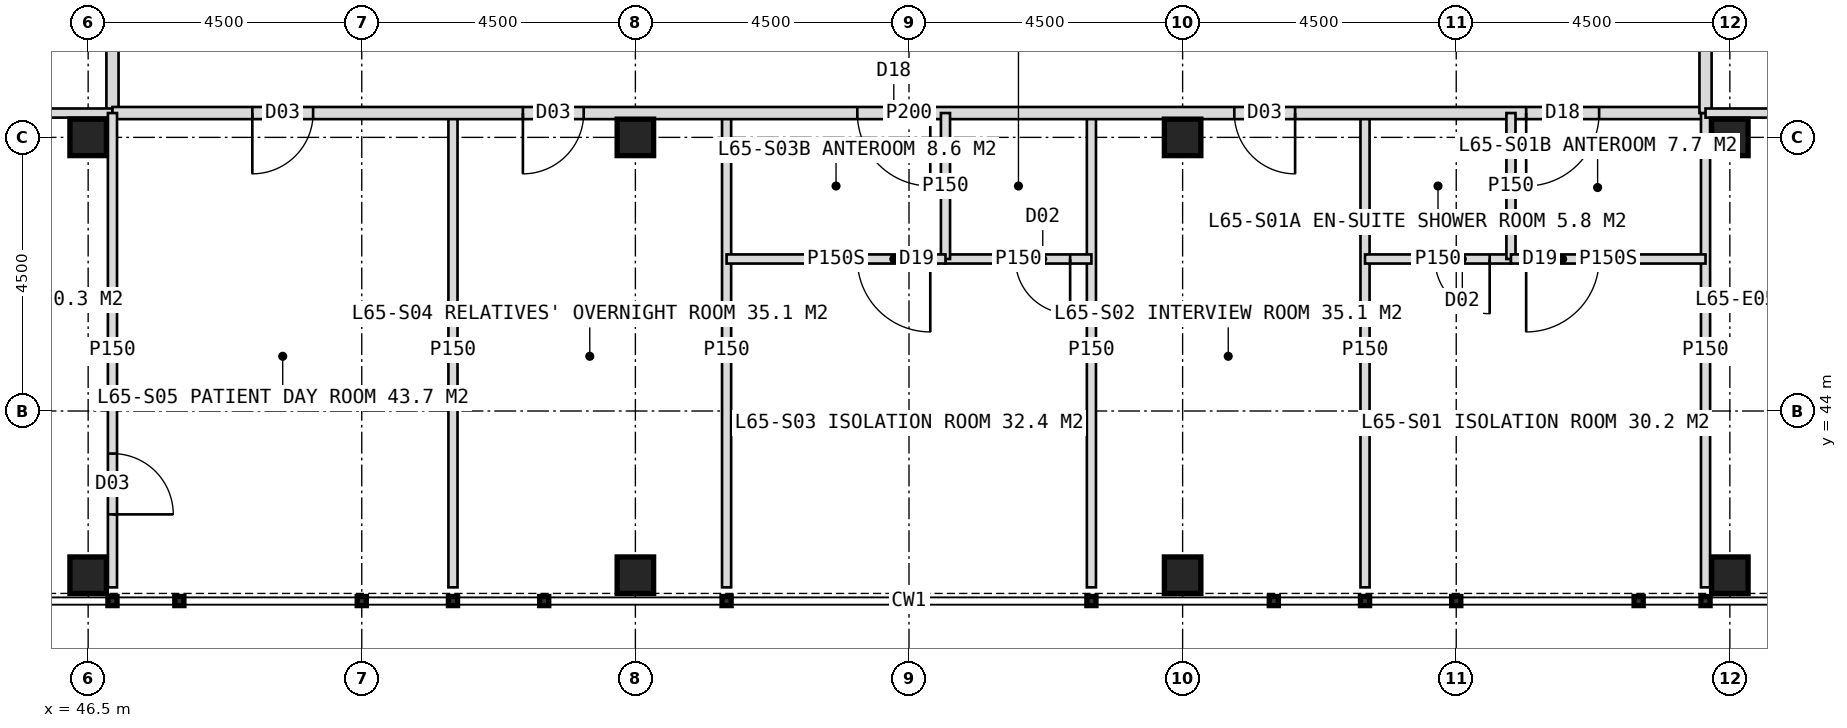
"""IFC4 building model, lengths in metres.
Left out: names, types, materials, properties, quantities, classifications, styles, units other than length and angle.
Written with IfcOpenShell. Run it as: python <this file> out.ifc"""

import sys

from ifc_helpers import new_model, si_unit, direction, frame, frame_2d, origin, origin_2d, place, context, subcontext, project, spatial, rectangle, hollow_rectangle, extrude, element, fill, save


model = new_model("IFC4")
c1 = context("Model", 3, precision=1e-05, world=origin(), true_north=direction((0.0, 1.0)))
c2 = subcontext(c1, "Body", "Model", "MODEL_VIEW")
j1 = project(units=[si_unit("LENGTHUNIT", "METRE"), si_unit("PLANEANGLEUNIT", "RADIAN")], contexts=[c1])
p1 = place(None, origin())
s1 = spatial("IfcSite", under=j1, at=p1, CompositionType="ELEMENT")
p2 = place(p1, origin())
s2 = spatial("IfcBuilding", under=s1, at=p2, CompositionType="ELEMENT")
p3 = place(p2, frame((0.0, 0.0, 270.0)))
s3 = spatial("IfcBuildingStorey", under=s2, at=p3, CompositionType="ELEMENT", Elevation=270.0)
for number, where, z_axis, x_axis in (
    (1, (46.5, 48.5, 0.0), (0.0, 0.0, 1.0), (1.0, 0.0, 0.0)),
    (2, (73.5, 48.5, 0.0), (0.0, 0.0, 1.0), (1.0, 0.0, 0.0)),
    (3, (55.5, 48.5, 0.0), (0.0, 0.0, 1.0), (1.0, 0.0, 0.0)),
    (4, (64.5, 48.5, 0.0), (0.0, 0.0, 1.0), (1.0, 0.0, 0.0)),
    (5, (46.5, 41.3, 0.0), (0.0, 0.0, 1.0), (1.0, 0.0, 0.0)),
    (6, (55.5, 41.3, 0.0), (0.0, 0.0, 1.0), (1.0, 0.0, 0.0)),
    (7, (64.5, 41.3, 0.0), (0.0, 0.0, 1.0), (1.0, 0.0, 0.0)),
    (8, (73.5, 41.3, 0.0), (0.0, 0.0, 1.0), (1.0, 0.0, 0.0)),
):
    element("IfcColumn", number, at=place(p3, frame(where, z_axis=z_axis, x_axis=x_axis)), inside=s3, PredefinedType="COLUMN", context=c2, shape_type="SweptSolid", body=[
        extrude(hollow_rectangle(XDim=0.6, YDim=0.6, WallThickness=0.04, at=origin_2d()), origin(), (0.0, 0.0, 1.0), 4.0),
    ])
p4 = place(p3, frame((46.9, 48.9, 0.0), z_axis=(0.0, 0.0, 1.0), x_axis=(0.0, 1.0, 0.0)))
e9 = element("IfcWall", 9, at=p4, inside=s3, PredefinedType="PARTITIONING", context=c2, shape_type="SweptSolid", body=[
    extrude(rectangle(XDim=26.2, YDim=0.2, at=frame_2d((13.1, 0.0))), origin(), (0.0, 0.0, 1.0), 3.75),
])
p5 = place(p4, frame((1.55, 0.0, 0.0)))
e10 = element("IfcOpeningElement", 10, at=p5, cuts=e9, PredefinedType="OPENING", context=c2, shape_type="SweptSolid", body=[
    extrude(rectangle(XDim=1.0, YDim=2.1, at=frame_2d((0.5, 1.05))), frame((0.0, 0.11, 0.0), z_axis=(0.0, -1.0, 0.0), x_axis=(1.0, 0.0, 0.0)), (0.0, 0.0, 1.0), 0.22),
])
p6 = place(p4, frame((6.6, 0.0, 0.0)))
e11 = element("IfcOpeningElement", 11, at=p6, cuts=e9, PredefinedType="OPENING", context=c2, shape_type="SweptSolid", body=[
    extrude(rectangle(XDim=1.0, YDim=2.1, at=frame_2d((0.5, 1.05))), frame((0.0, 0.11, 0.0), z_axis=(0.0, -1.0, 0.0), x_axis=(1.0, 0.0, 0.0)), (0.0, 0.0, 1.0), 0.22),
])
p7 = place(p4, frame((11.1, 0.0, 0.0)))
e12 = element("IfcOpeningElement", 12, at=p7, cuts=e9, PredefinedType="OPENING", context=c2, shape_type="SweptSolid", body=[
    extrude(rectangle(XDim=1.0, YDim=2.1, at=frame_2d((0.5, 1.05))), frame((0.0, 0.11, 0.0), z_axis=(0.0, -1.0, 0.0), x_axis=(1.0, 0.0, 0.0)), (0.0, 0.0, 1.0), 0.22),
])
p8 = place(p4, frame((18.45, 0.0, 0.0)))
e13 = element("IfcOpeningElement", 13, at=p8, cuts=e9, PredefinedType="OPENING", context=c2, shape_type="SweptSolid", body=[
    extrude(rectangle(XDim=1.2, YDim=2.2, at=frame_2d((0.6, 1.1))), frame((0.0, 0.11, 0.0), z_axis=(0.0, -1.0, 0.0), x_axis=(1.0, 0.0, 0.0)), (0.0, 0.0, 1.0), 0.22),
])
p9 = place(p4, frame((22.9, 0.0, 0.0)))
e14 = element("IfcOpeningElement", 14, at=p9, cuts=e9, PredefinedType="OPENING", context=c2, shape_type="SweptSolid", body=[
    extrude(rectangle(XDim=1.0, YDim=2.1, at=frame_2d((0.5, 1.05))), frame((0.0, 0.11, 0.0), z_axis=(0.0, -1.0, 0.0), x_axis=(1.0, 0.0, 0.0)), (0.0, 0.0, 1.0), 0.22),
])
for number, where, z_axis, x_axis in (
    (15, (46.9, 48.9, 0.0), (0.0, 0.0, 1.0), (-1.0, 0.0, 0.0)),
    (16, (67.5, 48.9, 0.0), (0.0, 0.0, 1.0), (0.0, -1.0, 0.0)),
    (17, (63.0, 48.9, 0.0), (0.0, 0.0, 1.0), (0.0, -1.0, 0.0)),
    (18, (57.0, 48.9, 0.0), (0.0, 0.0, 1.0), (0.0, -1.0, 0.0)),
    (19, (52.5, 48.9, 0.0), (0.0, 0.0, 1.0), (0.0, -1.0, 0.0)),
):
    element("IfcWall", number, at=place(p3, frame(where, z_axis=z_axis, x_axis=x_axis)), inside=s3, PredefinedType="PARTITIONING", context=c2, shape_type="SweptSolid", body=[
        extrude(rectangle(XDim=7.8, YDim=0.15, at=frame_2d((3.9, 0.0))), origin(), (0.0, 0.0, 1.0), 3.75),
    ])
p10 = place(p3, frame((73.1, 48.9, 0.0), z_axis=(0.0, 0.0, 1.0), x_axis=(-1.0, 0.0, 0.0)))
e20 = element("IfcWall", 20, at=p10, inside=s3, PredefinedType="PARTITIONING", context=c2, shape_type="SweptSolid", body=[
    extrude(rectangle(XDim=26.2, YDim=0.2, at=frame_2d((13.1, 0.0))), origin(), (0.0, 0.0, 1.0), 3.75),
])
p11 = place(p10, frame((1.75, 0.0, 0.0)))
e21 = element("IfcOpeningElement", 21, at=p11, cuts=e20, PredefinedType="OPENING", context=c2, shape_type="SweptSolid", body=[
    extrude(rectangle(XDim=1.2, YDim=2.2, at=frame_2d((0.6, 1.1))), frame((0.0, 0.11, 0.0), z_axis=(0.0, -1.0, 0.0), x_axis=(1.0, 0.0, 0.0)), (0.0, 0.0, 1.0), 0.22),
])
p12 = place(p10, frame((6.75, 0.0, 0.0)))
e22 = element("IfcOpeningElement", 22, at=p12, cuts=e20, PredefinedType="OPENING", context=c2, shape_type="SweptSolid", body=[
    extrude(rectangle(XDim=1.0, YDim=2.1, at=frame_2d((0.5, 1.05))), frame((0.0, 0.11, 0.0), z_axis=(0.0, -1.0, 0.0), x_axis=(1.0, 0.0, 0.0)), (0.0, 0.0, 1.0), 0.22),
])
p13 = place(p10, frame((12.75, 0.0, 0.0)))
e23 = element("IfcOpeningElement", 23, at=p13, cuts=e20, PredefinedType="OPENING", context=c2, shape_type="SweptSolid", body=[
    extrude(rectangle(XDim=1.2, YDim=2.2, at=frame_2d((0.6, 1.1))), frame((0.0, 0.11, 0.0), z_axis=(0.0, -1.0, 0.0), x_axis=(1.0, 0.0, 0.0)), (0.0, 0.0, 1.0), 0.22),
])
p14 = place(p10, frame((18.45, 0.0, 0.0)))
e24 = element("IfcOpeningElement", 24, at=p14, cuts=e20, PredefinedType="OPENING", context=c2, shape_type="SweptSolid", body=[
    extrude(rectangle(XDim=1.0, YDim=2.1, at=frame_2d((0.5, 1.05))), frame((0.0, 0.11, 0.0), z_axis=(0.0, -1.0, 0.0), x_axis=(1.0, 0.0, 0.0)), (0.0, 0.0, 1.0), 0.22),
])
p15 = place(p10, frame((22.9, 0.0, 0.0)))
e25 = element("IfcOpeningElement", 25, at=p15, cuts=e20, PredefinedType="OPENING", context=c2, shape_type="SweptSolid", body=[
    extrude(rectangle(XDim=1.0, YDim=2.1, at=frame_2d((0.5, 1.05))), frame((0.0, 0.11, 0.0), z_axis=(0.0, -1.0, 0.0), x_axis=(1.0, 0.0, 0.0)), (0.0, 0.0, 1.0), 0.22),
])
p16 = place(p3, frame((73.1, 48.9, 0.0), z_axis=(0.0, 0.0, 1.0), x_axis=(0.0, -1.0, 0.0)))
e26 = element("IfcWall", 26, at=p16, inside=s3, PredefinedType="PARTITIONING", context=c2, shape_type="SweptSolid", body=[
    extrude(rectangle(XDim=7.8, YDim=0.15, at=frame_2d((3.9, 0.0))), origin(), (0.0, 0.0, 1.0), 3.75),
])
p17 = place(p3, frame((69.9, 46.5, 0.0), z_axis=(0.0, 0.0, 1.0), x_axis=(-1.0, 0.0, 0.0)))
e27 = element("IfcWall", 27, at=p17, inside=s3, PredefinedType="PARTITIONING", context=c2, shape_type="SweptSolid", body=[
    extrude(rectangle(XDim=2.4, YDim=0.15, at=frame_2d((1.2, 0.0))), origin(), (0.0, 0.0, 1.0), 3.75),
])
p18 = place(p17, frame((0.35, 0.0, 0.0)))
e28 = element("IfcOpeningElement", 28, at=p18, cuts=e27, PredefinedType="OPENING", context=c2, shape_type="SweptSolid", body=[
    extrude(rectangle(XDim=0.9, YDim=2.1, at=frame_2d((0.45, 1.05))), frame((0.0, 0.085, 0.0), z_axis=(0.0, -1.0, 0.0), x_axis=(1.0, 0.0, 0.0)), (0.0, 0.0, 1.0), 0.17),
])
p19 = place(p3, frame((69.9, 48.9, 0.0), z_axis=(0.0, 0.0, 1.0), x_axis=(0.0, -1.0, 0.0)))
e29 = element("IfcWall", 29, at=p19, inside=s3, PredefinedType="PARTITIONING", context=c2, shape_type="SweptSolid", body=[
    extrude(rectangle(XDim=2.4, YDim=0.15, at=frame_2d((1.2, 0.0))), origin(), (0.0, 0.0, 1.0), 3.75),
])
p20 = place(p3, frame((73.1, 46.5, 0.0), z_axis=(0.0, 0.0, 1.0), x_axis=(-1.0, 0.0, 0.0)))
e30 = element("IfcWall", 30, at=p20, inside=s3, PredefinedType="PARTITIONING", context=c2, shape_type="SweptSolid", body=[
    extrude(rectangle(XDim=3.2, YDim=0.15, at=frame_2d((1.6, 0.0))), origin(), (0.0, 0.0, 1.0), 3.75),
])
p21 = place(p20, frame((1.75, 0.0, 0.0)))
e31 = element("IfcOpeningElement", 31, at=p21, cuts=e30, PredefinedType="OPENING", context=c2, shape_type="SweptSolid", body=[
    extrude(rectangle(XDim=1.2, YDim=2.2, at=frame_2d((0.6, 1.1))), frame((0.0, 0.085, 0.0), z_axis=(0.0, -1.0, 0.0), x_axis=(1.0, 0.0, 0.0)), (0.0, 0.0, 1.0), 0.17),
])
p22 = place(p3, frame((63.0, 46.5, 0.0), z_axis=(0.0, 0.0, 1.0), x_axis=(-1.0, 0.0, 0.0)))
e32 = element("IfcWall", 32, at=p22, inside=s3, PredefinedType="PARTITIONING", context=c2, shape_type="SweptSolid", body=[
    extrude(rectangle(XDim=2.4, YDim=0.15, at=frame_2d((1.2, 0.0))), origin(), (0.0, 0.0, 1.0), 3.75),
])
p23 = place(p22, frame((0.35, 0.0, 0.0)))
e33 = element("IfcOpeningElement", 33, at=p23, cuts=e32, PredefinedType="OPENING", context=c2, shape_type="SweptSolid", body=[
    extrude(rectangle(XDim=0.9, YDim=2.1, at=frame_2d((0.45, 1.05))), frame((0.0, 0.085, 0.0), z_axis=(0.0, -1.0, 0.0), x_axis=(1.0, 0.0, 0.0)), (0.0, 0.0, 1.0), 0.17),
])
p24 = place(p3, frame((60.6, 48.9, 0.0), z_axis=(0.0, 0.0, 1.0), x_axis=(0.0, -1.0, 0.0)))
e34 = element("IfcWall", 34, at=p24, inside=s3, PredefinedType="PARTITIONING", context=c2, shape_type="SweptSolid", body=[
    extrude(rectangle(XDim=2.4, YDim=0.15, at=frame_2d((1.2, 0.0))), origin(), (0.0, 0.0, 1.0), 3.75),
])
p25 = place(p3, frame((60.6, 46.5, 0.0), z_axis=(0.0, 0.0, 1.0), x_axis=(-1.0, 0.0, 0.0)))
e35 = element("IfcWall", 35, at=p25, inside=s3, PredefinedType="PARTITIONING", context=c2, shape_type="SweptSolid", body=[
    extrude(rectangle(XDim=3.6, YDim=0.15, at=frame_2d((1.8, 0.0))), origin(), (0.0, 0.0, 1.0), 3.75),
])
p26 = place(p25, frame((0.25, 0.0, 0.0)))
e36 = element("IfcOpeningElement", 36, at=p26, cuts=e35, PredefinedType="OPENING", context=c2, shape_type="SweptSolid", body=[
    extrude(rectangle(XDim=1.2, YDim=2.2, at=frame_2d((0.6, 1.1))), frame((0.0, 0.085, 0.0), z_axis=(0.0, -1.0, 0.0), x_axis=(1.0, 0.0, 0.0)), (0.0, 0.0, 1.0), 0.17),
])
p27 = place(p3, frame((46.9, 48.9, 0.0), z_axis=(0.0, 0.0, 1.0), x_axis=(0.0, -1.0, 0.0)))
e37 = element("IfcWall", 37, at=p27, inside=s3, PredefinedType="PARTITIONING", context=c2, shape_type="SweptSolid", body=[
    extrude(rectangle(XDim=7.8, YDim=0.15, at=frame_2d((3.9, 0.0))), origin(), (0.0, 0.0, 1.0), 3.75),
])
p28 = place(p27, frame((5.6, 0.0, 0.0)))
e38 = element("IfcOpeningElement", 38, at=p28, cuts=e37, PredefinedType="OPENING", context=c2, shape_type="SweptSolid", body=[
    extrude(rectangle(XDim=1.0, YDim=2.1, at=frame_2d((0.5, 1.05))), frame((0.0, 0.085, 0.0), z_axis=(0.0, -1.0, 0.0), x_axis=(1.0, 0.0, 0.0)), (0.0, 0.0, 1.0), 0.17),
])
p29 = place(p3, frame((73.1, 71.0, 0.0), z_axis=(0.0, 0.0, 1.0), x_axis=(0.0, -1.0, 0.0)))
e39 = element("IfcWall", 39, at=p29, inside=s3, PredefinedType="PARTITIONING", context=c2, shape_type="SweptSolid", body=[
    extrude(rectangle(XDim=22.1, YDim=0.2, at=frame_2d((11.05, 0.0))), origin(), (0.0, 0.0, 1.0), 3.75),
])
p30 = place(p29, frame((2.65, 0.0, 0.0)))
e40 = element("IfcOpeningElement", 40, at=p30, cuts=e39, PredefinedType="OPENING", context=c2, shape_type="SweptSolid", body=[
    extrude(rectangle(XDim=1.0, YDim=2.1, at=frame_2d((0.5, 1.05))), frame((0.0, 0.11, 0.0), z_axis=(0.0, -1.0, 0.0), x_axis=(1.0, 0.0, 0.0)), (0.0, 0.0, 1.0), 0.22),
])
p31 = place(p29, frame((7.0, 0.0, 0.0)))
e41 = element("IfcOpeningElement", 41, at=p31, cuts=e39, PredefinedType="OPENING", context=c2, shape_type="SweptSolid", body=[
    extrude(rectangle(XDim=1.0, YDim=2.1, at=frame_2d((0.5, 1.05))), frame((0.0, 0.11, 0.0), z_axis=(0.0, -1.0, 0.0), x_axis=(1.0, 0.0, 0.0)), (0.0, 0.0, 1.0), 0.22),
])
p32 = place(p29, frame((9.75, 0.0, 0.0)))
e42 = element("IfcOpeningElement", 42, at=p32, cuts=e39, PredefinedType="OPENING", context=c2, shape_type="SweptSolid", body=[
    extrude(rectangle(XDim=0.9, YDim=2.1, at=frame_2d((0.45, 1.05))), frame((0.0, 0.11, 0.0), z_axis=(0.0, -1.0, 0.0), x_axis=(1.0, 0.0, 0.0)), (0.0, 0.0, 1.0), 0.22),
])
p33 = place(p29, frame((11.65, 0.0, 0.0)))
e43 = element("IfcOpeningElement", 43, at=p33, cuts=e39, PredefinedType="OPENING", context=c2, shape_type="SweptSolid", body=[
    extrude(rectangle(XDim=1.0, YDim=2.1, at=frame_2d((0.5, 1.05))), frame((0.0, 0.11, 0.0), z_axis=(0.0, -1.0, 0.0), x_axis=(1.0, 0.0, 0.0)), (0.0, 0.0, 1.0), 0.22),
])
p34 = place(p29, frame((18.8, 0.0, 0.0)))
e44 = element("IfcOpeningElement", 44, at=p34, cuts=e39, PredefinedType="OPENING", context=c2, shape_type="SweptSolid", body=[
    extrude(rectangle(XDim=1.0, YDim=2.1, at=frame_2d((0.5, 1.05))), frame((0.0, 0.11, 0.0), z_axis=(0.0, -1.0, 0.0), x_axis=(1.0, 0.0, 0.0)), (0.0, 0.0, 1.0), 0.22),
])
p35 = place(p3, frame((73.1, 48.9, 0.0), z_axis=(0.0, 0.0, 1.0), x_axis=(1.0, 0.0, 0.0)))
e45 = element("IfcWall", 45, at=p35, inside=s3, PredefinedType="PARTITIONING", context=c2, shape_type="SweptSolid", body=[
    extrude(rectangle(XDim=7.8, YDim=0.15, at=frame_2d((3.9, 0.0))), origin(), (0.0, 0.0, 1.0), 3.75),
])
p36 = place(p35, frame((5.6, 0.0, 0.0)))
e46 = element("IfcOpeningElement", 46, at=p36, cuts=e45, PredefinedType="OPENING", context=c2, shape_type="SweptSolid", body=[
    extrude(rectangle(XDim=1.0, YDim=2.1, at=frame_2d((0.5, 1.05))), frame((0.0, 0.085, 0.0), z_axis=(0.0, -1.0, 0.0), x_axis=(1.0, 0.0, 0.0)), (0.0, 0.0, 1.0), 0.17),
])
p37 = place(p21, origin())
e47 = element("IfcDoor", 47, at=p37, inside=s3, OperationType="SINGLE_SWING_RIGHT", PredefinedType="DOOR", context=c2, shape_type="SweptSolid", body=[
    extrude(rectangle(XDim=1.2, YDim=2.2, at=frame_2d((0.6, 1.1))), frame((0.0, 0.025, 0.0), z_axis=(0.0, -1.0, 0.0), x_axis=(1.0, 0.0, 0.0)), (0.0, 0.0, 1.0), 0.05),
])
fill(e31, e47)
p38 = place(p11, origin())
e48 = element("IfcDoor", 48, at=p38, inside=s3, OperationType="SINGLE_SWING_RIGHT", PredefinedType="DOOR", context=c2, shape_type="SweptSolid", body=[
    extrude(rectangle(XDim=1.2, YDim=2.2, at=frame_2d((0.6, 1.1))), frame((0.0, 0.025, 0.0), z_axis=(0.0, -1.0, 0.0), x_axis=(1.0, 0.0, 0.0)), (0.0, 0.0, 1.0), 0.05),
])
fill(e21, e48)
p39 = place(p18, origin())
e49 = element("IfcDoor", 49, at=p39, inside=s3, OperationType="SINGLE_SWING_LEFT", PredefinedType="DOOR", context=c2, shape_type="SweptSolid", body=[
    extrude(rectangle(XDim=0.9, YDim=2.1, at=frame_2d((0.45, 1.05))), frame((0.0, 0.025, 0.0), z_axis=(0.0, -1.0, 0.0), x_axis=(1.0, 0.0, 0.0)), (0.0, 0.0, 1.0), 0.05),
])
fill(e28, e49)
p40 = place(p12, origin())
e50 = element("IfcDoor", 50, at=p40, inside=s3, OperationType="SINGLE_SWING_LEFT", PredefinedType="DOOR", context=c2, shape_type="SweptSolid", body=[
    extrude(rectangle(XDim=1.0, YDim=2.1, at=frame_2d((0.5, 1.05))), frame((0.0, 0.025, 0.0), z_axis=(0.0, -1.0, 0.0), x_axis=(1.0, 0.0, 0.0)), (0.0, 0.0, 1.0), 0.05),
])
fill(e22, e50)
p41 = place(p26, origin())
e51 = element("IfcDoor", 51, at=p41, inside=s3, OperationType="SINGLE_SWING_LEFT", PredefinedType="DOOR", context=c2, shape_type="SweptSolid", body=[
    extrude(rectangle(XDim=1.2, YDim=2.2, at=frame_2d((0.6, 1.1))), frame((0.0, 0.025, 0.0), z_axis=(0.0, -1.0, 0.0), x_axis=(1.0, 0.0, 0.0)), (0.0, 0.0, 1.0), 0.05),
])
fill(e36, e51)
p42 = place(p13, origin())
e52 = element("IfcDoor", 52, at=p42, inside=s3, OperationType="SINGLE_SWING_LEFT", PredefinedType="DOOR", context=c2, shape_type="SweptSolid", body=[
    extrude(rectangle(XDim=1.2, YDim=2.2, at=frame_2d((0.6, 1.1))), frame((0.0, 0.025, 0.0), z_axis=(0.0, -1.0, 0.0), x_axis=(1.0, 0.0, 0.0)), (0.0, 0.0, 1.0), 0.05),
])
fill(e23, e52)
p43 = place(p23, origin())
e53 = element("IfcDoor", 53, at=p43, inside=s3, OperationType="SINGLE_SWING_LEFT", PredefinedType="DOOR", context=c2, shape_type="SweptSolid", body=[
    extrude(rectangle(XDim=0.9, YDim=2.1, at=frame_2d((0.45, 1.05))), frame((0.0, 0.025, 0.0), z_axis=(0.0, -1.0, 0.0), x_axis=(1.0, 0.0, 0.0)), (0.0, 0.0, 1.0), 0.05),
])
fill(e33, e53)
p44 = place(p14, origin())
e54 = element("IfcDoor", 54, at=p44, inside=s3, OperationType="SINGLE_SWING_RIGHT", PredefinedType="DOOR", context=c2, shape_type="SweptSolid", body=[
    extrude(rectangle(XDim=1.0, YDim=2.1, at=frame_2d((0.5, 1.05))), frame((0.0, 0.025, 0.0), z_axis=(0.0, -1.0, 0.0), x_axis=(1.0, 0.0, 0.0)), (0.0, 0.0, 1.0), 0.05),
])
fill(e24, e54)
p45 = place(p28, origin())
e55 = element("IfcDoor", 55, at=p45, inside=s3, OperationType="SINGLE_SWING_RIGHT", PredefinedType="DOOR", context=c2, shape_type="SweptSolid", body=[
    extrude(rectangle(XDim=1.0, YDim=2.1, at=frame_2d((0.5, 1.05))), frame((0.0, 0.025, 0.0), z_axis=(0.0, -1.0, 0.0), x_axis=(1.0, 0.0, 0.0)), (0.0, 0.0, 1.0), 0.05),
])
fill(e38, e55)
p46 = place(p15, origin())
e56 = element("IfcDoor", 56, at=p46, inside=s3, OperationType="SINGLE_SWING_RIGHT", PredefinedType="DOOR", context=c2, shape_type="SweptSolid", body=[
    extrude(rectangle(XDim=1.0, YDim=2.1, at=frame_2d((0.5, 1.05))), frame((0.0, 0.025, 0.0), z_axis=(0.0, -1.0, 0.0), x_axis=(1.0, 0.0, 0.0)), (0.0, 0.0, 1.0), 0.05),
])
fill(e25, e56)
save(model, sys.argv[1])
